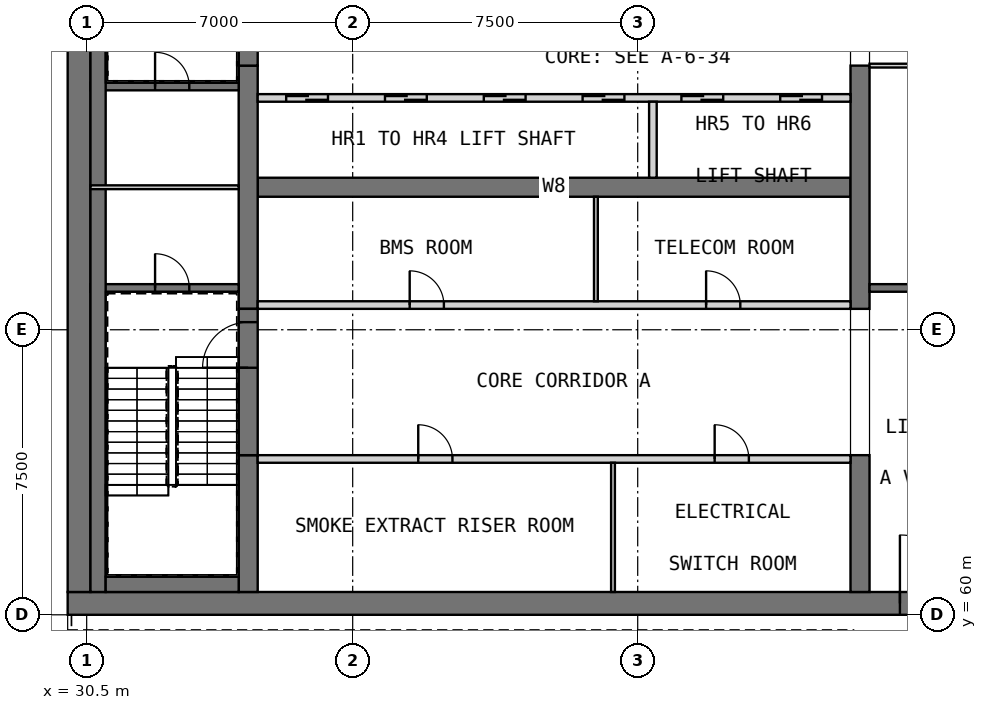
"""IFC4 building model, lengths in metres.
Left out: names, types, materials, properties, quantities, classifications, styles, units other than length and angle.
Written with IfcOpenShell. Run it as: python <this file> out.ifc"""

import sys

from ifc_helpers import new_model, si_unit, direction, frame, frame_2d, origin, place, context, subcontext, project, spatial, rectangle, extrude, element, fill, save


model = new_model("IFC4")
c1 = context("Model", 3, precision=1e-05, world=origin(), true_north=direction((0.0, 1.0)))
c2 = subcontext(c1, "Body", "Model", "MODEL_VIEW")
j1 = project(units=[si_unit("LENGTHUNIT", "METRE"), si_unit("PLANEANGLEUNIT", "RADIAN")], contexts=[c1])
p1 = place(None, origin())
s1 = spatial("IfcSite", under=j1, at=p1, CompositionType="ELEMENT")
p2 = place(p1, origin())
s2 = spatial("IfcBuilding", under=s1, at=p2, CompositionType="ELEMENT")
p3 = place(p2, frame((0.0, 0.0, 258.2)))
s3 = spatial("IfcBuildingStorey", under=s2, at=p3, CompositionType="ELEMENT", Elevation=258.2)
p4 = place(p3, frame((30.0, 60.3, 0.0), z_axis=(0.0, 0.0, 1.0), x_axis=(1.0, 0.0, 0.0)))
e1 = element("IfcWall", 1, at=p4, inside=s3, PredefinedType="SHEAR", context=c2, shape_type="SweptSolid", body=[
    extrude(rectangle(XDim=30.0, YDim=0.6, at=frame_2d((15.0, 0.0))), origin(), (0.0, 0.0, 1.0), 8.0),
])
p5 = place(p4, frame((21.9, 0.0, 0.0)))
e2 = element("IfcOpeningElement", 2, at=p5, cuts=e1, PredefinedType="OPENING", context=c2, shape_type="SweptSolid", body=[
    extrude(rectangle(XDim=1.8, YDim=2.1, at=frame_2d((0.9, 1.05))), frame((0.0, 0.31, 0.0), z_axis=(0.0, -1.0, 0.0), x_axis=(1.0, 0.0, 0.0)), (0.0, 0.0, 1.0), 0.62),
])
p6 = place(p4, frame((26.5, 0.0, 0.0)))
e3 = element("IfcOpeningElement", 3, at=p6, cuts=e1, PredefinedType="OPENING", context=c2, shape_type="SweptSolid", body=[
    extrude(rectangle(XDim=1.2, YDim=2.1, at=frame_2d((0.6, 1.05))), frame((0.0, 0.31, 0.0), z_axis=(0.0, -1.0, 0.0), x_axis=(1.0, 0.0, 0.0)), (0.0, 0.0, 1.0), 0.62),
])
p7 = place(p3, frame((30.3, 60.6, 0.0), z_axis=(0.0, 0.0, 1.0), x_axis=(0.0, 1.0, 0.0)))
e4 = element("IfcWall", 4, at=p7, inside=s3, PredefinedType="SHEAR", context=c2, shape_type="SweptSolid", body=[
    extrude(rectangle(XDim=21.3, YDim=0.6, at=frame_2d((10.65, 0.0))), origin(), (0.0, 0.0, 1.0), 8.0),
])
p8 = place(p3, frame((35.0, 71.25, 0.0), z_axis=(0.0, 0.0, 1.0), x_axis=(1.0, 0.0, 0.0)))
e5 = element("IfcWall", 5, at=p8, inside=s3, PredefinedType="SHEAR", context=c2, shape_type="SweptSolid", body=[
    extrude(rectangle(XDim=15.6, YDim=0.5, at=frame_2d((7.8, 0.0))), origin(), (0.0, 0.0, 1.0), 8.0),
])
p9 = place(p3, frame((34.75, 60.6, 0.0), z_axis=(0.0, 0.0, 1.0), x_axis=(0.0, 1.0, 0.0)))
e6 = element("IfcWall", 6, at=p9, inside=s3, PredefinedType="SHEAR", context=c2, shape_type="SweptSolid", body=[
    extrude(rectangle(XDim=3.6, YDim=0.5, at=frame_2d((1.8, 0.0))), origin(), (0.0, 0.0, 1.0), 8.0),
])
p10 = place(p3, frame((34.75, 68.05, 0.0), z_axis=(0.0, 0.0, 1.0), x_axis=(0.0, 1.0, 0.0)))
e7 = element("IfcWall", 7, at=p10, inside=s3, PredefinedType="SHEAR", context=c2, shape_type="SweptSolid", body=[
    extrude(rectangle(XDim=6.4, YDim=0.5, at=frame_2d((3.2, 0.0))), origin(), (0.0, 0.0, 1.0), 8.0),
])
p11 = place(p3, frame((50.85, 60.6, 0.0), z_axis=(0.0, 0.0, 1.0), x_axis=(0.0, 1.0, 0.0)))
e8 = element("IfcWall", 8, at=p11, inside=s3, PredefinedType="SHEAR", context=c2, shape_type="SweptSolid", body=[
    extrude(rectangle(XDim=3.6, YDim=0.5, at=frame_2d((1.8, 0.0))), origin(), (0.0, 0.0, 1.0), 8.0),
])
p12 = place(p3, frame((50.85, 68.05, 0.0), z_axis=(0.0, 0.0, 1.0), x_axis=(0.0, 1.0, 0.0)))
e9 = element("IfcWall", 9, at=p12, inside=s3, PredefinedType="SHEAR", context=c2, shape_type="SweptSolid", body=[
    extrude(rectangle(XDim=6.4, YDim=0.5, at=frame_2d((3.2, 0.0))), origin(), (0.0, 0.0, 1.0), 8.0),
])
p13 = place(p2, frame((0.0, 0.0, 34.0)))
s4 = spatial("IfcBuildingStorey", under=s2, at=p13, CompositionType="ELEMENT", Elevation=34.0)
for number, where, z_axis, x_axis in (
    (10, (29.7, 61.05, 0.0), (0.0, 0.0, 1.0), (0.0, 1.0, 0.0)),
    (11, (29.7, 65.925, 0.0), (0.0, 0.0, 1.0), (0.0, 1.0, 0.0)),
    (12, (29.7, 70.8, 0.0), (0.0, 0.0, 1.0), (0.0, 1.0, 0.0)),
):
    element("IfcWall", number, at=place(p13, frame(where, z_axis=z_axis, x_axis=x_axis)), inside=s4, PredefinedType="SOLIDWALL", context=c2, shape_type="SweptSolid", body=[
        extrude(rectangle(XDim=0.9, YDim=0.6, at=frame_2d((0.45, 0.0))), origin(), (0.0, 0.0, 1.0), 286.2),
    ])
p14 = place(p3, frame((35.0, 64.1, 0.0), z_axis=(0.0, 0.0, 1.0), x_axis=(1.0, 0.0, 0.0)))
e13 = element("IfcWall", 13, at=p14, inside=s3, PredefinedType="PARTITIONING", context=c2, shape_type="SweptSolid", body=[
    extrude(rectangle(XDim=15.6, YDim=0.2, at=frame_2d((7.8, 0.0))), origin(), (0.0, 0.0, 1.0), 7.75),
])
p15 = place(p14, frame((4.225, 0.0, 0.0)))
e14 = element("IfcOpeningElement", 14, at=p15, cuts=e13, PredefinedType="OPENING", context=c2, shape_type="SweptSolid", body=[
    extrude(rectangle(XDim=0.9, YDim=2.1, at=frame_2d((0.45, 1.05))), frame((0.0, 0.11, 0.0), z_axis=(0.0, -1.0, 0.0), x_axis=(1.0, 0.0, 0.0)), (0.0, 0.0, 1.0), 0.22),
])
p16 = place(p14, frame((12.025, 0.0, 0.0)))
e15 = element("IfcOpeningElement", 15, at=p16, cuts=e13, PredefinedType="OPENING", context=c2, shape_type="SweptSolid", body=[
    extrude(rectangle(XDim=0.9, YDim=2.1, at=frame_2d((0.45, 1.05))), frame((0.0, 0.11, 0.0), z_axis=(0.0, -1.0, 0.0), x_axis=(1.0, 0.0, 0.0)), (0.0, 0.0, 1.0), 0.22),
])
p17 = place(p3, frame((44.35, 60.6, 0.0), z_axis=(0.0, 0.0, 1.0), x_axis=(0.0, 1.0, 0.0)))
e16 = element("IfcWall", 16, at=p17, inside=s3, PredefinedType="PARTITIONING", context=c2, shape_type="SweptSolid", body=[
    extrude(rectangle(XDim=3.4, YDim=0.1, at=frame_2d((1.7, 0.0))), origin(), (0.0, 0.0, 1.0), 7.75),
])
p18 = place(p3, frame((35.0, 68.15, 0.0), z_axis=(0.0, 0.0, 1.0), x_axis=(1.0, 0.0, 0.0)))
e17 = element("IfcWall", 17, at=p18, inside=s3, PredefinedType="PARTITIONING", context=c2, shape_type="SweptSolid", body=[
    extrude(rectangle(XDim=15.6, YDim=0.2, at=frame_2d((7.8, 0.0))), origin(), (0.0, 0.0, 1.0), 7.75),
])
p19 = place(p18, frame((4.0, 0.0, 0.0)))
e18 = element("IfcOpeningElement", 18, at=p19, cuts=e17, PredefinedType="OPENING", context=c2, shape_type="SweptSolid", body=[
    extrude(rectangle(XDim=0.9, YDim=2.1, at=frame_2d((0.45, 1.05))), frame((0.0, 0.11, 0.0), z_axis=(0.0, -1.0, 0.0), x_axis=(1.0, 0.0, 0.0)), (0.0, 0.0, 1.0), 0.22),
])
p20 = place(p18, frame((11.8, 0.0, 0.0)))
e19 = element("IfcOpeningElement", 19, at=p20, cuts=e17, PredefinedType="OPENING", context=c2, shape_type="SweptSolid", body=[
    extrude(rectangle(XDim=0.9, YDim=2.1, at=frame_2d((0.45, 1.05))), frame((0.0, 0.11, 0.0), z_axis=(0.0, -1.0, 0.0), x_axis=(1.0, 0.0, 0.0)), (0.0, 0.0, 1.0), 0.22),
])
p21 = place(p3, frame((43.9, 68.25, 0.0), z_axis=(0.0, 0.0, 1.0), x_axis=(0.0, 1.0, 0.0)))
e20 = element("IfcWall", 20, at=p21, inside=s3, PredefinedType="PARTITIONING", context=c2, shape_type="SweptSolid", body=[
    extrude(rectangle(XDim=2.75, YDim=0.1, at=frame_2d((1.375, 0.0))), origin(), (0.0, 0.0, 1.0), 7.75),
])
p22 = place(p3, frame((35.0, 73.6, 0.0), z_axis=(0.0, 0.0, 1.0), x_axis=(1.0, 0.0, 0.0)))
e21 = element("IfcWall", 21, at=p22, inside=s3, PredefinedType="SOLIDWALL", context=c2, shape_type="SweptSolid", body=[
    extrude(rectangle(XDim=15.6, YDim=0.2, at=frame_2d((7.8, 0.0))), origin(), (0.0, 0.0, 1.0), 8.0),
])
p23 = place(p22, frame((0.75, 0.0, 0.0)))
e22 = element("IfcOpeningElement", 22, at=p23, cuts=e21, PredefinedType="OPENING", context=c2, shape_type="SweptSolid", body=[
    extrude(rectangle(XDim=1.1, YDim=2.1, at=frame_2d((0.55, 1.05))), frame((0.0, 0.11, 0.0), z_axis=(0.0, -1.0, 0.0), x_axis=(1.0, 0.0, 0.0)), (0.0, 0.0, 1.0), 0.22),
])
p24 = place(p22, frame((3.35, 0.0, 0.0)))
e23 = element("IfcOpeningElement", 23, at=p24, cuts=e21, PredefinedType="OPENING", context=c2, shape_type="SweptSolid", body=[
    extrude(rectangle(XDim=1.1, YDim=2.1, at=frame_2d((0.55, 1.05))), frame((0.0, 0.11, 0.0), z_axis=(0.0, -1.0, 0.0), x_axis=(1.0, 0.0, 0.0)), (0.0, 0.0, 1.0), 0.22),
])
p25 = place(p22, frame((5.95, 0.0, 0.0)))
e24 = element("IfcOpeningElement", 24, at=p25, cuts=e21, PredefinedType="OPENING", context=c2, shape_type="SweptSolid", body=[
    extrude(rectangle(XDim=1.1, YDim=2.1, at=frame_2d((0.55, 1.05))), frame((0.0, 0.11, 0.0), z_axis=(0.0, -1.0, 0.0), x_axis=(1.0, 0.0, 0.0)), (0.0, 0.0, 1.0), 0.22),
])
p26 = place(p22, frame((8.55, 0.0, 0.0)))
e25 = element("IfcOpeningElement", 25, at=p26, cuts=e21, PredefinedType="OPENING", context=c2, shape_type="SweptSolid", body=[
    extrude(rectangle(XDim=1.1, YDim=2.1, at=frame_2d((0.55, 1.05))), frame((0.0, 0.11, 0.0), z_axis=(0.0, -1.0, 0.0), x_axis=(1.0, 0.0, 0.0)), (0.0, 0.0, 1.0), 0.22),
])
p27 = place(p22, frame((11.15, 0.0, 0.0)))
e26 = element("IfcOpeningElement", 26, at=p27, cuts=e21, PredefinedType="OPENING", context=c2, shape_type="SweptSolid", body=[
    extrude(rectangle(XDim=1.1, YDim=2.1, at=frame_2d((0.55, 1.05))), frame((0.0, 0.11, 0.0), z_axis=(0.0, -1.0, 0.0), x_axis=(1.0, 0.0, 0.0)), (0.0, 0.0, 1.0), 0.22),
])
p28 = place(p22, frame((13.75, 0.0, 0.0)))
e27 = element("IfcOpeningElement", 27, at=p28, cuts=e21, PredefinedType="OPENING", context=c2, shape_type="SweptSolid", body=[
    extrude(rectangle(XDim=1.1, YDim=2.1, at=frame_2d((0.55, 1.05))), frame((0.0, 0.11, 0.0), z_axis=(0.0, -1.0, 0.0), x_axis=(1.0, 0.0, 0.0)), (0.0, 0.0, 1.0), 0.22),
])
p29 = place(p3, frame((45.4, 71.5, 0.0), z_axis=(0.0, 0.0, 1.0), x_axis=(0.0, 1.0, 0.0)))
e28 = element("IfcWall", 28, at=p29, inside=s3, PredefinedType="SOLIDWALL", context=c2, shape_type="SweptSolid", body=[
    extrude(rectangle(XDim=2.0, YDim=0.2, at=frame_2d((1.0, 0.0))), origin(), (0.0, 0.0, 1.0), 8.0),
])
p30 = place(p3, frame((34.75, 64.2, 0.0), z_axis=(0.0, 0.0, 1.0), x_axis=(0.0, 1.0, 0.0)))
e29 = element("IfcWall", 29, at=p30, inside=s3, PredefinedType="SOLIDWALL", context=c2, shape_type="SweptSolid", body=[
    extrude(rectangle(XDim=3.85, YDim=0.5, at=frame_2d((1.925, 0.0))), origin(), (0.0, 0.0, 1.0), 6.8),
])
p31 = place(p30, frame((2.3, 0.0, 0.0)))
e30 = element("IfcOpeningElement", 30, at=p31, cuts=e29, PredefinedType="OPENING", context=c2, shape_type="SweptSolid", body=[
    extrude(rectangle(XDim=1.2, YDim=2.1, at=frame_2d((0.6, 1.05))), frame((0.0, 0.26, 0.0), z_axis=(0.0, -1.0, 0.0), x_axis=(1.0, 0.0, 0.0)), (0.0, 0.0, 1.0), 0.52),
])
p32 = place(p3, frame((34.75, 74.45, 0.0), z_axis=(0.0, 0.0, 1.0), x_axis=(0.0, 1.0, 0.0)))
e31 = element("IfcWall", 31, at=p32, inside=s3, PredefinedType="SOLIDWALL", context=c2, shape_type="SweptSolid", body=[
    extrude(rectangle(XDim=3.85, YDim=0.5, at=frame_2d((1.925, 0.0))), origin(), (0.0, 0.0, 1.0), 6.8),
])
p33 = place(p32, frame((1.0, 0.0, 0.0)))
e32 = element("IfcOpeningElement", 32, at=p33, cuts=e31, PredefinedType="OPENING", context=c2, shape_type="SweptSolid", body=[
    extrude(rectangle(XDim=1.2, YDim=2.1, at=frame_2d((0.6, 1.05))), frame((0.0, 0.26, 0.0), z_axis=(0.0, -1.0, 0.0), x_axis=(1.0, 0.0, 0.0)), (0.0, 0.0, 1.0), 0.52),
])
p34 = place(p3, frame((30.6, 68.6, 0.0), z_axis=(0.0, 0.0, 1.0), x_axis=(1.0, 0.0, 0.0)))
e33 = element("IfcWall", 33, at=p34, inside=s3, PredefinedType="SOLIDWALL", context=c2, shape_type="SweptSolid", body=[
    extrude(rectangle(XDim=3.9, YDim=0.2, at=frame_2d((1.95, 0.0))), origin(), (0.0, 0.0, 1.0), 7.75),
])
p35 = place(p34, frame((1.7, 0.0, 0.0)))
e34 = element("IfcOpeningElement", 34, at=p35, cuts=e33, PredefinedType="OPENING", context=c2, shape_type="SweptSolid", body=[
    extrude(rectangle(XDim=0.9, YDim=2.1, at=frame_2d((0.45, 1.05))), frame((0.0, 0.11, 0.0), z_axis=(0.0, -1.0, 0.0), x_axis=(1.0, 0.0, 0.0)), (0.0, 0.0, 1.0), 0.22),
])
p36 = place(p3, frame((30.6, 73.9, 0.0), z_axis=(0.0, 0.0, 1.0), x_axis=(1.0, 0.0, 0.0)))
e35 = element("IfcWall", 35, at=p36, inside=s3, PredefinedType="SOLIDWALL", context=c2, shape_type="SweptSolid", body=[
    extrude(rectangle(XDim=3.9, YDim=0.2, at=frame_2d((1.95, 0.0))), origin(), (0.0, 0.0, 1.0), 7.75),
])
p37 = place(p36, frame((1.7, 0.0, 0.0)))
e36 = element("IfcOpeningElement", 36, at=p37, cuts=e35, PredefinedType="OPENING", context=c2, shape_type="SweptSolid", body=[
    extrude(rectangle(XDim=0.9, YDim=2.1, at=frame_2d((0.45, 1.05))), frame((0.0, 0.11, 0.0), z_axis=(0.0, -1.0, 0.0), x_axis=(1.0, 0.0, 0.0)), (0.0, 0.0, 1.0), 0.22),
])
p38 = place(p3, frame((51.1, 68.6, 0.0), z_axis=(0.0, 0.0, 1.0), x_axis=(1.0, 0.0, 0.0)))
e37 = element("IfcWall", 37, at=p38, inside=s3, PredefinedType="SOLIDWALL", context=c2, shape_type="SweptSolid", body=[
    extrude(rectangle(XDim=8.3, YDim=0.2, at=frame_2d((4.15, 0.0))), origin(), (0.0, 0.0, 1.0), 7.75),
])
p39 = place(p3, frame((30.8, 60.6, 0.0), z_axis=(0.0, 0.0, 1.0), x_axis=(0.0, 1.0, 0.0)))
e38 = element("IfcWall", 38, at=p39, inside=s3, PredefinedType="SOLIDWALL", context=c2, shape_type="SweptSolid", body=[
    extrude(rectangle(XDim=21.3, YDim=0.4, at=frame_2d((10.65, 0.0))), origin(), (0.0, 0.0, 1.0), 7.75),
])
p40 = place(p3, frame((31.0, 60.8, 0.0), z_axis=(0.0, 0.0, 1.0), x_axis=(1.0, 0.0, 0.0)))
e39 = element("IfcWall", 39, at=p40, inside=s3, PredefinedType="SOLIDWALL", context=c2, shape_type="SweptSolid", body=[
    extrude(rectangle(XDim=3.5, YDim=0.4, at=frame_2d((1.75, 0.0))), origin(), (0.0, 0.0, 1.0), 7.75),
])
p41 = place(p3, frame((30.6, 71.25, 0.0), z_axis=(0.0, 0.0, 1.0), x_axis=(1.0, 0.0, 0.0)))
e40 = element("IfcWall", 40, at=p41, inside=s3, PredefinedType="PARTITIONING", context=c2, shape_type="SweptSolid", body=[
    extrude(rectangle(XDim=3.9, YDim=0.1, at=frame_2d((1.95, 0.0))), origin(), (0.0, 0.0, 1.0), 7.75),
])
p42 = place(p3, frame((51.1, 74.45, 0.0), z_axis=(0.0, 0.0, 1.0), x_axis=(1.0, 0.0, 0.0)))
e41 = element("IfcWall", 41, at=p42, inside=s3, PredefinedType="PARTITIONING", context=c2, shape_type="SweptSolid", body=[
    extrude(rectangle(XDim=8.3, YDim=0.1, at=frame_2d((4.15, 0.0))), origin(), (0.0, 0.0, 1.0), 7.75),
])
p43 = place(p42, frame((3.7, 0.0, 0.0)))
e42 = element("IfcOpeningElement", 42, at=p43, cuts=e41, PredefinedType="OPENING", context=c2, shape_type="SweptSolid", body=[
    extrude(rectangle(XDim=0.9, YDim=2.1, at=frame_2d((0.45, 1.05))), frame((0.0, 0.06, 0.0), z_axis=(0.0, -1.0, 0.0), x_axis=(1.0, 0.0, 0.0)), (0.0, 0.0, 1.0), 0.12),
])
p44 = place(p15, origin())
e43 = element("IfcDoor", 43, at=p44, inside=s3, OperationType="SINGLE_SWING_LEFT", PredefinedType="DOOR", context=c2, shape_type="SweptSolid", body=[
    extrude(rectangle(XDim=0.9, YDim=2.1, at=frame_2d((0.45, 1.05))), frame((0.0, 0.025, 0.0), z_axis=(0.0, -1.0, 0.0), x_axis=(1.0, 0.0, 0.0)), (0.0, 0.0, 1.0), 0.05),
])
fill(e14, e43)
p45 = place(p16, origin())
e44 = element("IfcDoor", 44, at=p45, inside=s3, OperationType="SINGLE_SWING_RIGHT", PredefinedType="DOOR", context=c2, shape_type="SweptSolid", body=[
    extrude(rectangle(XDim=0.9, YDim=2.1, at=frame_2d((0.45, 1.05))), frame((0.0, 0.025, 0.0), z_axis=(0.0, -1.0, 0.0), x_axis=(1.0, 0.0, 0.0)), (0.0, 0.0, 1.0), 0.05),
])
fill(e15, e44)
p46 = place(p19, origin())
e45 = element("IfcDoor", 45, at=p46, inside=s3, OperationType="SINGLE_SWING_LEFT", PredefinedType="DOOR", context=c2, shape_type="SweptSolid", body=[
    extrude(rectangle(XDim=0.9, YDim=2.1, at=frame_2d((0.45, 1.05))), frame((0.0, 0.025, 0.0), z_axis=(0.0, -1.0, 0.0), x_axis=(1.0, 0.0, 0.0)), (0.0, 0.0, 1.0), 0.05),
])
fill(e18, e45)
p47 = place(p20, origin())
e46 = element("IfcDoor", 46, at=p47, inside=s3, OperationType="SINGLE_SWING_RIGHT", PredefinedType="DOOR", context=c2, shape_type="SweptSolid", body=[
    extrude(rectangle(XDim=0.9, YDim=2.1, at=frame_2d((0.45, 1.05))), frame((0.0, 0.025, 0.0), z_axis=(0.0, -1.0, 0.0), x_axis=(1.0, 0.0, 0.0)), (0.0, 0.0, 1.0), 0.05),
])
fill(e19, e46)
p48 = place(p23, origin())
e47 = element("IfcDoor", 47, at=p48, inside=s3, OperationType="DOUBLE_DOOR_SLIDING", PredefinedType="DOOR", context=c2, shape_type="SweptSolid", body=[
    extrude(rectangle(XDim=1.1, YDim=2.1, at=frame_2d((0.55, 1.05))), frame((0.0, 0.025, 0.0), z_axis=(0.0, -1.0, 0.0), x_axis=(1.0, 0.0, 0.0)), (0.0, 0.0, 1.0), 0.05),
])
fill(e22, e47)
p49 = place(p24, origin())
e48 = element("IfcDoor", 48, at=p49, inside=s3, OperationType="DOUBLE_DOOR_SLIDING", PredefinedType="DOOR", context=c2, shape_type="SweptSolid", body=[
    extrude(rectangle(XDim=1.1, YDim=2.1, at=frame_2d((0.55, 1.05))), frame((0.0, 0.025, 0.0), z_axis=(0.0, -1.0, 0.0), x_axis=(1.0, 0.0, 0.0)), (0.0, 0.0, 1.0), 0.05),
])
fill(e23, e48)
p50 = place(p25, origin())
e49 = element("IfcDoor", 49, at=p50, inside=s3, OperationType="DOUBLE_DOOR_SLIDING", PredefinedType="DOOR", context=c2, shape_type="SweptSolid", body=[
    extrude(rectangle(XDim=1.1, YDim=2.1, at=frame_2d((0.55, 1.05))), frame((0.0, 0.025, 0.0), z_axis=(0.0, -1.0, 0.0), x_axis=(1.0, 0.0, 0.0)), (0.0, 0.0, 1.0), 0.05),
])
fill(e24, e49)
p51 = place(p26, origin())
e50 = element("IfcDoor", 50, at=p51, inside=s3, OperationType="DOUBLE_DOOR_SLIDING", PredefinedType="DOOR", context=c2, shape_type="SweptSolid", body=[
    extrude(rectangle(XDim=1.1, YDim=2.1, at=frame_2d((0.55, 1.05))), frame((0.0, 0.025, 0.0), z_axis=(0.0, -1.0, 0.0), x_axis=(1.0, 0.0, 0.0)), (0.0, 0.0, 1.0), 0.05),
])
fill(e25, e50)
p52 = place(p27, origin())
e51 = element("IfcDoor", 51, at=p52, inside=s3, OperationType="DOUBLE_DOOR_SLIDING", PredefinedType="DOOR", context=c2, shape_type="SweptSolid", body=[
    extrude(rectangle(XDim=1.1, YDim=2.1, at=frame_2d((0.55, 1.05))), frame((0.0, 0.025, 0.0), z_axis=(0.0, -1.0, 0.0), x_axis=(1.0, 0.0, 0.0)), (0.0, 0.0, 1.0), 0.05),
])
fill(e26, e51)
p53 = place(p28, origin())
e52 = element("IfcDoor", 52, at=p53, inside=s3, OperationType="DOUBLE_DOOR_SLIDING", PredefinedType="DOOR", context=c2, shape_type="SweptSolid", body=[
    extrude(rectangle(XDim=1.1, YDim=2.1, at=frame_2d((0.55, 1.05))), frame((0.0, 0.025, 0.0), z_axis=(0.0, -1.0, 0.0), x_axis=(1.0, 0.0, 0.0)), (0.0, 0.0, 1.0), 0.05),
])
fill(e27, e52)
p54 = place(p5, origin())
e53 = element("IfcDoor", 53, at=p54, inside=s3, OperationType="DOUBLE_DOOR_SINGLE_SWING", PredefinedType="DOOR", context=c2, shape_type="SweptSolid", body=[
    extrude(rectangle(XDim=1.8, YDim=2.1, at=frame_2d((0.9, 1.05))), frame((0.0, 0.025, 0.0), z_axis=(0.0, -1.0, 0.0), x_axis=(1.0, 0.0, 0.0)), (0.0, 0.0, 1.0), 0.05),
])
fill(e2, e53)
p55 = place(p31, origin())
e54 = element("IfcDoor", 54, at=p55, inside=s3, OperationType="SINGLE_SWING_LEFT", PredefinedType="DOOR", context=c2, shape_type="SweptSolid", body=[
    extrude(rectangle(XDim=1.2, YDim=2.1, at=frame_2d((0.6, 1.05))), frame((0.0, 0.025, 0.0), z_axis=(0.0, -1.0, 0.0), x_axis=(1.0, 0.0, 0.0)), (0.0, 0.0, 1.0), 0.05),
])
fill(e30, e54)
p56 = place(p35, origin())
e55 = element("IfcDoor", 55, at=p56, inside=s3, OperationType="SINGLE_SWING_LEFT", PredefinedType="DOOR", context=c2, shape_type="SweptSolid", body=[
    extrude(rectangle(XDim=0.9, YDim=2.1, at=frame_2d((0.45, 1.05))), frame((0.0, 0.025, 0.0), z_axis=(0.0, -1.0, 0.0), x_axis=(1.0, 0.0, 0.0)), (0.0, 0.0, 1.0), 0.05),
])
fill(e34, e55)
p57 = place(p37, origin())
e56 = element("IfcDoor", 56, at=p57, inside=s3, OperationType="SINGLE_SWING_RIGHT", PredefinedType="DOOR", context=c2, shape_type="SweptSolid", body=[
    extrude(rectangle(XDim=0.9, YDim=2.1, at=frame_2d((0.45, 1.05))), frame((0.0, 0.025, 0.0), z_axis=(0.0, -1.0, 0.0), x_axis=(1.0, 0.0, 0.0)), (0.0, 0.0, 1.0), 0.05),
])
fill(e36, e56)
save(model, sys.argv[1])
